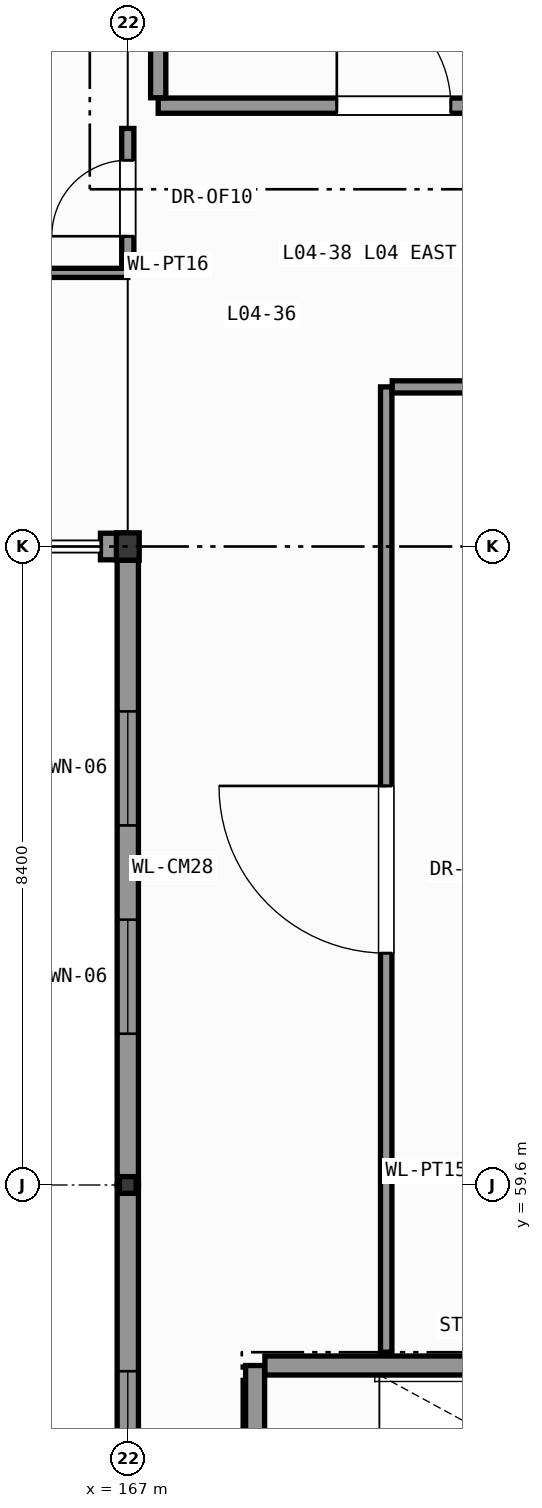
"""IFC4 building model, lengths in metres.
Left out: names, types, materials, properties, quantities, classifications, styles, units other than length and angle.
Written with IfcOpenShell. Run it as: python <this file> out.ifc"""

import sys

from ifc_helpers import new_model, si_unit, direction, frame, frame_2d, origin, origin_2d, place, context, subcontext, project, spatial, rectangle, hollow_rectangle, i_section, extrude, element, fill, save


model = new_model("IFC4")
c1 = context("Model", 3, precision=1e-05, world=origin(), true_north=direction((0.0, 1.0)))
c2 = subcontext(c1, "Body", "Model", "MODEL_VIEW")
j1 = project(units=[si_unit("LENGTHUNIT", "METRE"), si_unit("PLANEANGLEUNIT", "RADIAN")], contexts=[c1])
p1 = place(None, origin())
s1 = spatial("IfcSite", under=j1, at=p1, CompositionType="ELEMENT")
p2 = place(p1, origin())
s2 = spatial("IfcBuilding", under=s1, at=p2, CompositionType="ELEMENT")
p3 = place(p2, frame((0.0, 0.0, 18.0)))
s3 = spatial("IfcBuildingStorey", under=s2, at=p3, CompositionType="ELEMENT", Elevation=18.0)
p4 = place(p3, frame((167.0, 59.6, 0.0), z_axis=(0.0, 0.0, 1.0), x_axis=(1.0, 0.0, 0.0)))
e1 = element("IfcColumn", 1, at=p4, inside=s3, PredefinedType="COLUMN", context=c2, shape_type="SweptSolid", body=[
    extrude(hollow_rectangle(XDim=0.22, YDim=0.22, WallThickness=0.012, InnerFilletRadius=0.012, OuterFilletRadius=0.024, at=origin_2d()), origin(), (0.0, 0.0, 1.0), 4.2),
])
p5 = place(p3, frame((167.0, 68.0, 0.0), z_axis=(0.0, 0.0, 1.0), x_axis=(1.0, 0.0, 0.0)))
e2 = element("IfcColumn", 2, at=p5, inside=s3, PredefinedType="COLUMN", context=c2, shape_type="SweptSolid", body=[
    extrude(i_section(OverallWidth=0.3, OverallDepth=0.36, WebThickness=0.012, FlangeThickness=0.022, FilletRadius=0.027, at=origin_2d()), origin(), (0.0, 0.0, 1.0), 4.2),
])
p6 = place(p3, frame((166.64, 68.0, 0.0), z_axis=(0.0, 0.0, 1.0), x_axis=(1.0, 0.0, 0.0)))
e3 = element("IfcWall", 3, at=p6, inside=s3, PredefinedType="SOLIDWALL", context=c2, shape_type="SweptSolid", body=[
    extrude(rectangle(XDim=0.36, YDim=0.35, at=frame_2d((0.18, 0.0))), origin(), (0.0, 0.0, 1.0), 3.385),
])
p7 = place(p3, frame((167.0, 59.6, 0.0), z_axis=(0.0, 0.0, 1.0), x_axis=(0.0, 1.0, 0.0)))
e4 = element("IfcWall", 4, at=p7, inside=s3, PredefinedType="SOLIDWALL", context=c2, shape_type="SweptSolid", body=[
    extrude(rectangle(XDim=8.221, YDim=0.28, at=frame_2d((4.11, 0.0))), origin(), (0.0, 0.0, 1.0), 3.495),
])
p8 = place(p7, frame((1.99, 0.0, 0.95)))
e5 = element("IfcOpeningElement", 5, at=p8, cuts=e4, PredefinedType="OPENING", context=c2, shape_type="SweptSolid", body=[
    extrude(rectangle(XDim=1.5, YDim=2.15, at=frame_2d((0.75, 1.075))), frame((0.0, 0.15, 0.0), z_axis=(0.0, -1.0, 0.0), x_axis=(1.0, 0.0, 0.0)), (0.0, 0.0, 1.0), 0.3),
])
p9 = place(p7, frame((4.731, 0.0, 0.95)))
e6 = element("IfcOpeningElement", 6, at=p9, cuts=e4, PredefinedType="OPENING", context=c2, shape_type="SweptSolid", body=[
    extrude(rectangle(XDim=1.5, YDim=2.15, at=frame_2d((0.75, 1.075))), frame((0.0, 0.15, 0.0), z_axis=(0.0, -1.0, 0.0), x_axis=(1.0, 0.0, 0.0)), (0.0, 0.0, 1.0), 0.3),
])
p10 = place(p3, frame((167.0, 52.6, 0.0), z_axis=(0.0, 0.0, 1.0), x_axis=(0.0, 1.0, 0.0)))
e7 = element("IfcWall", 7, at=p10, inside=s3, PredefinedType="SOLIDWALL", context=c2, shape_type="SweptSolid", body=[
    extrude(rectangle(XDim=7.0, YDim=0.28, at=frame_2d((3.5, 0.0))), origin(), (0.0, 0.0, 1.0), 3.645),
])
p11 = place(p10, frame((2.45, 0.0, 0.95)))
e8 = element("IfcOpeningElement", 8, at=p11, cuts=e7, PredefinedType="OPENING", context=c2, shape_type="SweptSolid", body=[
    extrude(rectangle(XDim=2.1, YDim=2.29, at=frame_2d((1.05, 1.145))), frame((0.0, 0.15, 0.0), z_axis=(0.0, -1.0, 0.0), x_axis=(1.0, 0.0, 0.0)), (0.0, 0.0, 1.0), 0.3),
])
p12 = place(p3, frame((168.675, 53.875, 0.0), z_axis=(0.0, 0.0, 1.0), x_axis=(0.0, 1.0, 0.0)))
e9 = element("IfcWall", 9, at=p12, inside=s3, PredefinedType="SHEAR", context=c2, shape_type="SweptSolid", body=[
    extrude(rectangle(XDim=3.35, YDim=0.25, at=frame_2d((1.675, 0.0))), origin(), (0.0, 0.0, 1.0), 3.98),
])
p13 = place(p12, frame((0.975, 0.0, 0.0)))
e10 = element("IfcOpeningElement", 10, at=p13, cuts=e9, PredefinedType="OPENING", context=c2, shape_type="SweptSolid", body=[
    extrude(rectangle(XDim=1.4, YDim=2.2, at=frame_2d((0.7, 1.1))), frame((0.0, 0.135, 0.0), z_axis=(0.0, -1.0, 0.0), x_axis=(1.0, 0.0, 0.0)), (0.0, 0.0, 1.0), 0.27),
])
p14 = place(p3, frame((168.804, 57.225, 0.0), z_axis=(0.0, 0.0, 1.0), x_axis=(1.0, 0.0, 0.0)))
e11 = element("IfcWall", 11, at=p14, inside=s3, PredefinedType="SHEAR", context=c2, shape_type="SweptSolid", body=[
    extrude(rectangle(XDim=7.192, YDim=0.25, at=frame_2d((3.596, 0.0))), origin(), (0.0, 0.0, 1.0), 3.98),
])
p15 = place(p3, frame((167.4, 73.8, 0.0), z_axis=(0.0, 0.0, 1.0), x_axis=(1.0, 0.0, 0.0)))
e12 = element("IfcWall", 12, at=p15, inside=s3, PredefinedType="PARTITIONING", context=c2, shape_type="SweptSolid", body=[
    extrude(rectangle(XDim=6.2, YDim=0.2, at=frame_2d((3.1, 0.0))), origin(), (0.0, 0.0, 1.0), 3.575),
])
p16 = place(p15, frame((2.35, 0.0, 0.0)))
e13 = element("IfcOpeningElement", 13, at=p16, cuts=e12, PredefinedType="OPENING", context=c2, shape_type="SweptSolid", body=[
    extrude(rectangle(XDim=1.5, YDim=2.2, at=frame_2d((0.75, 1.1))), frame((0.0, 0.11, 0.0), z_axis=(0.0, -1.0, 0.0), x_axis=(1.0, 0.0, 0.0)), (0.0, 0.0, 1.0), 0.22),
])
p17 = place(p3, frame((167.4, 73.904, 0.0), z_axis=(0.0, 0.0, 1.0), x_axis=(0.0, 1.0, 0.0)))
e14 = element("IfcWall", 14, at=p17, inside=s3, PredefinedType="PARTITIONING", context=c2, shape_type="SweptSolid", body=[
    extrude(rectangle(XDim=4.296, YDim=0.2, at=frame_2d((2.148, 0.0))), origin(), (0.0, 0.0, 1.0), 3.98),
])
p18 = place(p3, frame((126.0, 71.6, 0.0), z_axis=(0.0, 0.0, 1.0), x_axis=(1.0, 0.0, 0.0)))
e15 = element("IfcWall", 15, at=p18, inside=s3, PredefinedType="PARTITIONING", context=c2, shape_type="SweptSolid", body=[
    extrude(rectangle(XDim=41.0, YDim=0.12, at=frame_2d((20.5, 0.0))), origin(), (0.0, 0.0, 1.0), 3.98),
])
p19 = place(p18, frame((19.4, 0.0, 0.0)))
e16 = element("IfcOpeningElement", 16, at=p19, cuts=e15, PredefinedType="OPENING", context=c2, shape_type="SweptSolid", body=[
    extrude(rectangle(XDim=2.2, YDim=2.6, at=frame_2d((1.1, 1.3))), frame((0.0, 0.07, 0.0), z_axis=(0.0, -1.0, 0.0), x_axis=(1.0, 0.0, 0.0)), (0.0, 0.0, 1.0), 0.14),
])
p20 = place(p3, frame((167.0, 71.664, 0.0), z_axis=(0.0, 0.0, 1.0), x_axis=(0.0, 1.0, 0.0)))
e17 = element("IfcWall", 17, at=p20, inside=s3, PredefinedType="PARTITIONING", context=c2, shape_type="SweptSolid", body=[
    extrude(rectangle(XDim=1.836, YDim=0.16, at=frame_2d((0.918, 0.0))), origin(), (0.0, 0.0, 1.0), 3.495),
])
p21 = place(p20, frame((0.418, 0.0, 0.0)))
e18 = element("IfcOpeningElement", 18, at=p21, cuts=e17, PredefinedType="OPENING", context=c2, shape_type="SweptSolid", body=[
    extrude(rectangle(XDim=1.0, YDim=2.15, at=frame_2d((0.5, 1.075))), frame((0.0, 0.09, 0.0), z_axis=(0.0, -1.0, 0.0), x_axis=(1.0, 0.0, 0.0)), (0.0, 0.0, 1.0), 0.18),
])
p22 = place(p3, frame((170.4, 57.4, 0.0), z_axis=(0.0, 0.0, 1.0), x_axis=(0.0, 1.0, 0.0)))
e19 = element("IfcWall", 19, at=p22, inside=s3, PredefinedType="PARTITIONING", context=c2, shape_type="SweptSolid", body=[
    extrude(rectangle(XDim=12.7, YDim=0.15, at=frame_2d((6.35, 0.0))), origin(), (0.0, 0.0, 1.0), 3.98),
])
p23 = place(p22, frame((5.25, 0.0, 0.0)))
e20 = element("IfcOpeningElement", 20, at=p23, cuts=e19, PredefinedType="OPENING", context=c2, shape_type="SweptSolid", body=[
    extrude(rectangle(XDim=2.2, YDim=2.6, at=frame_2d((1.1, 1.3))), frame((0.0, 0.085, 0.0), z_axis=(0.0, -1.0, 0.0), x_axis=(1.0, 0.0, 0.0)), (0.0, 0.0, 1.0), 0.17),
])
p24 = place(p3, frame((170.479, 70.1, 0.0), z_axis=(0.0, 0.0, 1.0), x_axis=(1.0, 0.0, 0.0)))
e21 = element("IfcWall", 21, at=p24, inside=s3, PredefinedType="PARTITIONING", context=c2, shape_type="SweptSolid", body=[
    extrude(rectangle(XDim=9.257, YDim=0.16, at=frame_2d((4.628, 0.0))), origin(), (0.0, 0.0, 1.0), 3.98),
])
p25 = place(p24, frame((3.529, 0.0, 0.0)))
e22 = element("IfcOpeningElement", 22, at=p25, cuts=e21, PredefinedType="OPENING", context=c2, shape_type="SweptSolid", body=[
    extrude(rectangle(XDim=2.2, YDim=2.6, at=frame_2d((1.1, 1.3))), frame((0.0, 0.09, 0.0), z_axis=(0.0, -1.0, 0.0), x_axis=(1.0, 0.0, 0.0)), (0.0, 0.0, 1.0), 0.18),
])
p26 = place(p8, origin())
e23 = element("IfcWindow", 23, at=p26, inside=s3, PartitioningType="SINGLE_PANEL", PredefinedType="WINDOW", context=c2, shape_type="SweptSolid", body=[
    extrude(rectangle(XDim=1.5, YDim=2.15, at=frame_2d((0.75, 1.075))), frame((0.0, 0.03, 0.0), z_axis=(0.0, -1.0, 0.0), x_axis=(1.0, 0.0, 0.0)), (0.0, 0.0, 1.0), 0.06),
])
fill(e5, e23)
p27 = place(p9, origin())
e24 = element("IfcWindow", 24, at=p27, inside=s3, PartitioningType="SINGLE_PANEL", PredefinedType="WINDOW", context=c2, shape_type="SweptSolid", body=[
    extrude(rectangle(XDim=1.5, YDim=2.15, at=frame_2d((0.75, 1.075))), frame((0.0, 0.03, 0.0), z_axis=(0.0, -1.0, 0.0), x_axis=(1.0, 0.0, 0.0)), (0.0, 0.0, 1.0), 0.06),
])
fill(e6, e24)
p28 = place(p11, origin())
e25 = element("IfcWindow", 25, at=p28, inside=s3, PartitioningType="SINGLE_PANEL", PredefinedType="WINDOW", context=c2, shape_type="SweptSolid", body=[
    extrude(rectangle(XDim=2.1, YDim=2.29, at=frame_2d((1.05, 1.145))), frame((0.0, 0.03, 0.0), z_axis=(0.0, -1.0, 0.0), x_axis=(1.0, 0.0, 0.0)), (0.0, 0.0, 1.0), 0.06),
])
fill(e8, e25)
p29 = place(p16, origin())
e26 = element("IfcDoor", 26, at=p29, inside=s3, OperationType="SINGLE_SWING_LEFT", PredefinedType="DOOR", context=c2, shape_type="SweptSolid", body=[
    extrude(rectangle(XDim=1.5, YDim=2.2, at=frame_2d((0.75, 1.1))), frame((0.0, 0.025, 0.0), z_axis=(0.0, -1.0, 0.0), x_axis=(1.0, 0.0, 0.0)), (0.0, 0.0, 1.0), 0.05),
])
fill(e13, e26)
p30 = place(p21, origin())
e27 = element("IfcDoor", 27, at=p30, inside=s3, OperationType="SINGLE_SWING_LEFT", PredefinedType="DOOR", context=c2, shape_type="SweptSolid", body=[
    extrude(rectangle(XDim=1.0, YDim=2.15, at=frame_2d((0.5, 1.075))), frame((0.0, 0.025, 0.0), z_axis=(0.0, -1.0, 0.0), x_axis=(1.0, 0.0, 0.0)), (0.0, 0.0, 1.0), 0.05),
])
fill(e18, e27)
p31 = place(p23, origin())
e28 = element("IfcDoor", 28, at=p31, inside=s3, OperationType="SINGLE_SWING_RIGHT", PredefinedType="DOOR", context=c2, shape_type="SweptSolid", body=[
    extrude(rectangle(XDim=2.2, YDim=2.6, at=frame_2d((1.1, 1.3))), frame((0.0, 0.025, 0.0), z_axis=(0.0, -1.0, 0.0), x_axis=(1.0, 0.0, 0.0)), (0.0, 0.0, 1.0), 0.05),
])
fill(e20, e28)
save(model, sys.argv[1])
